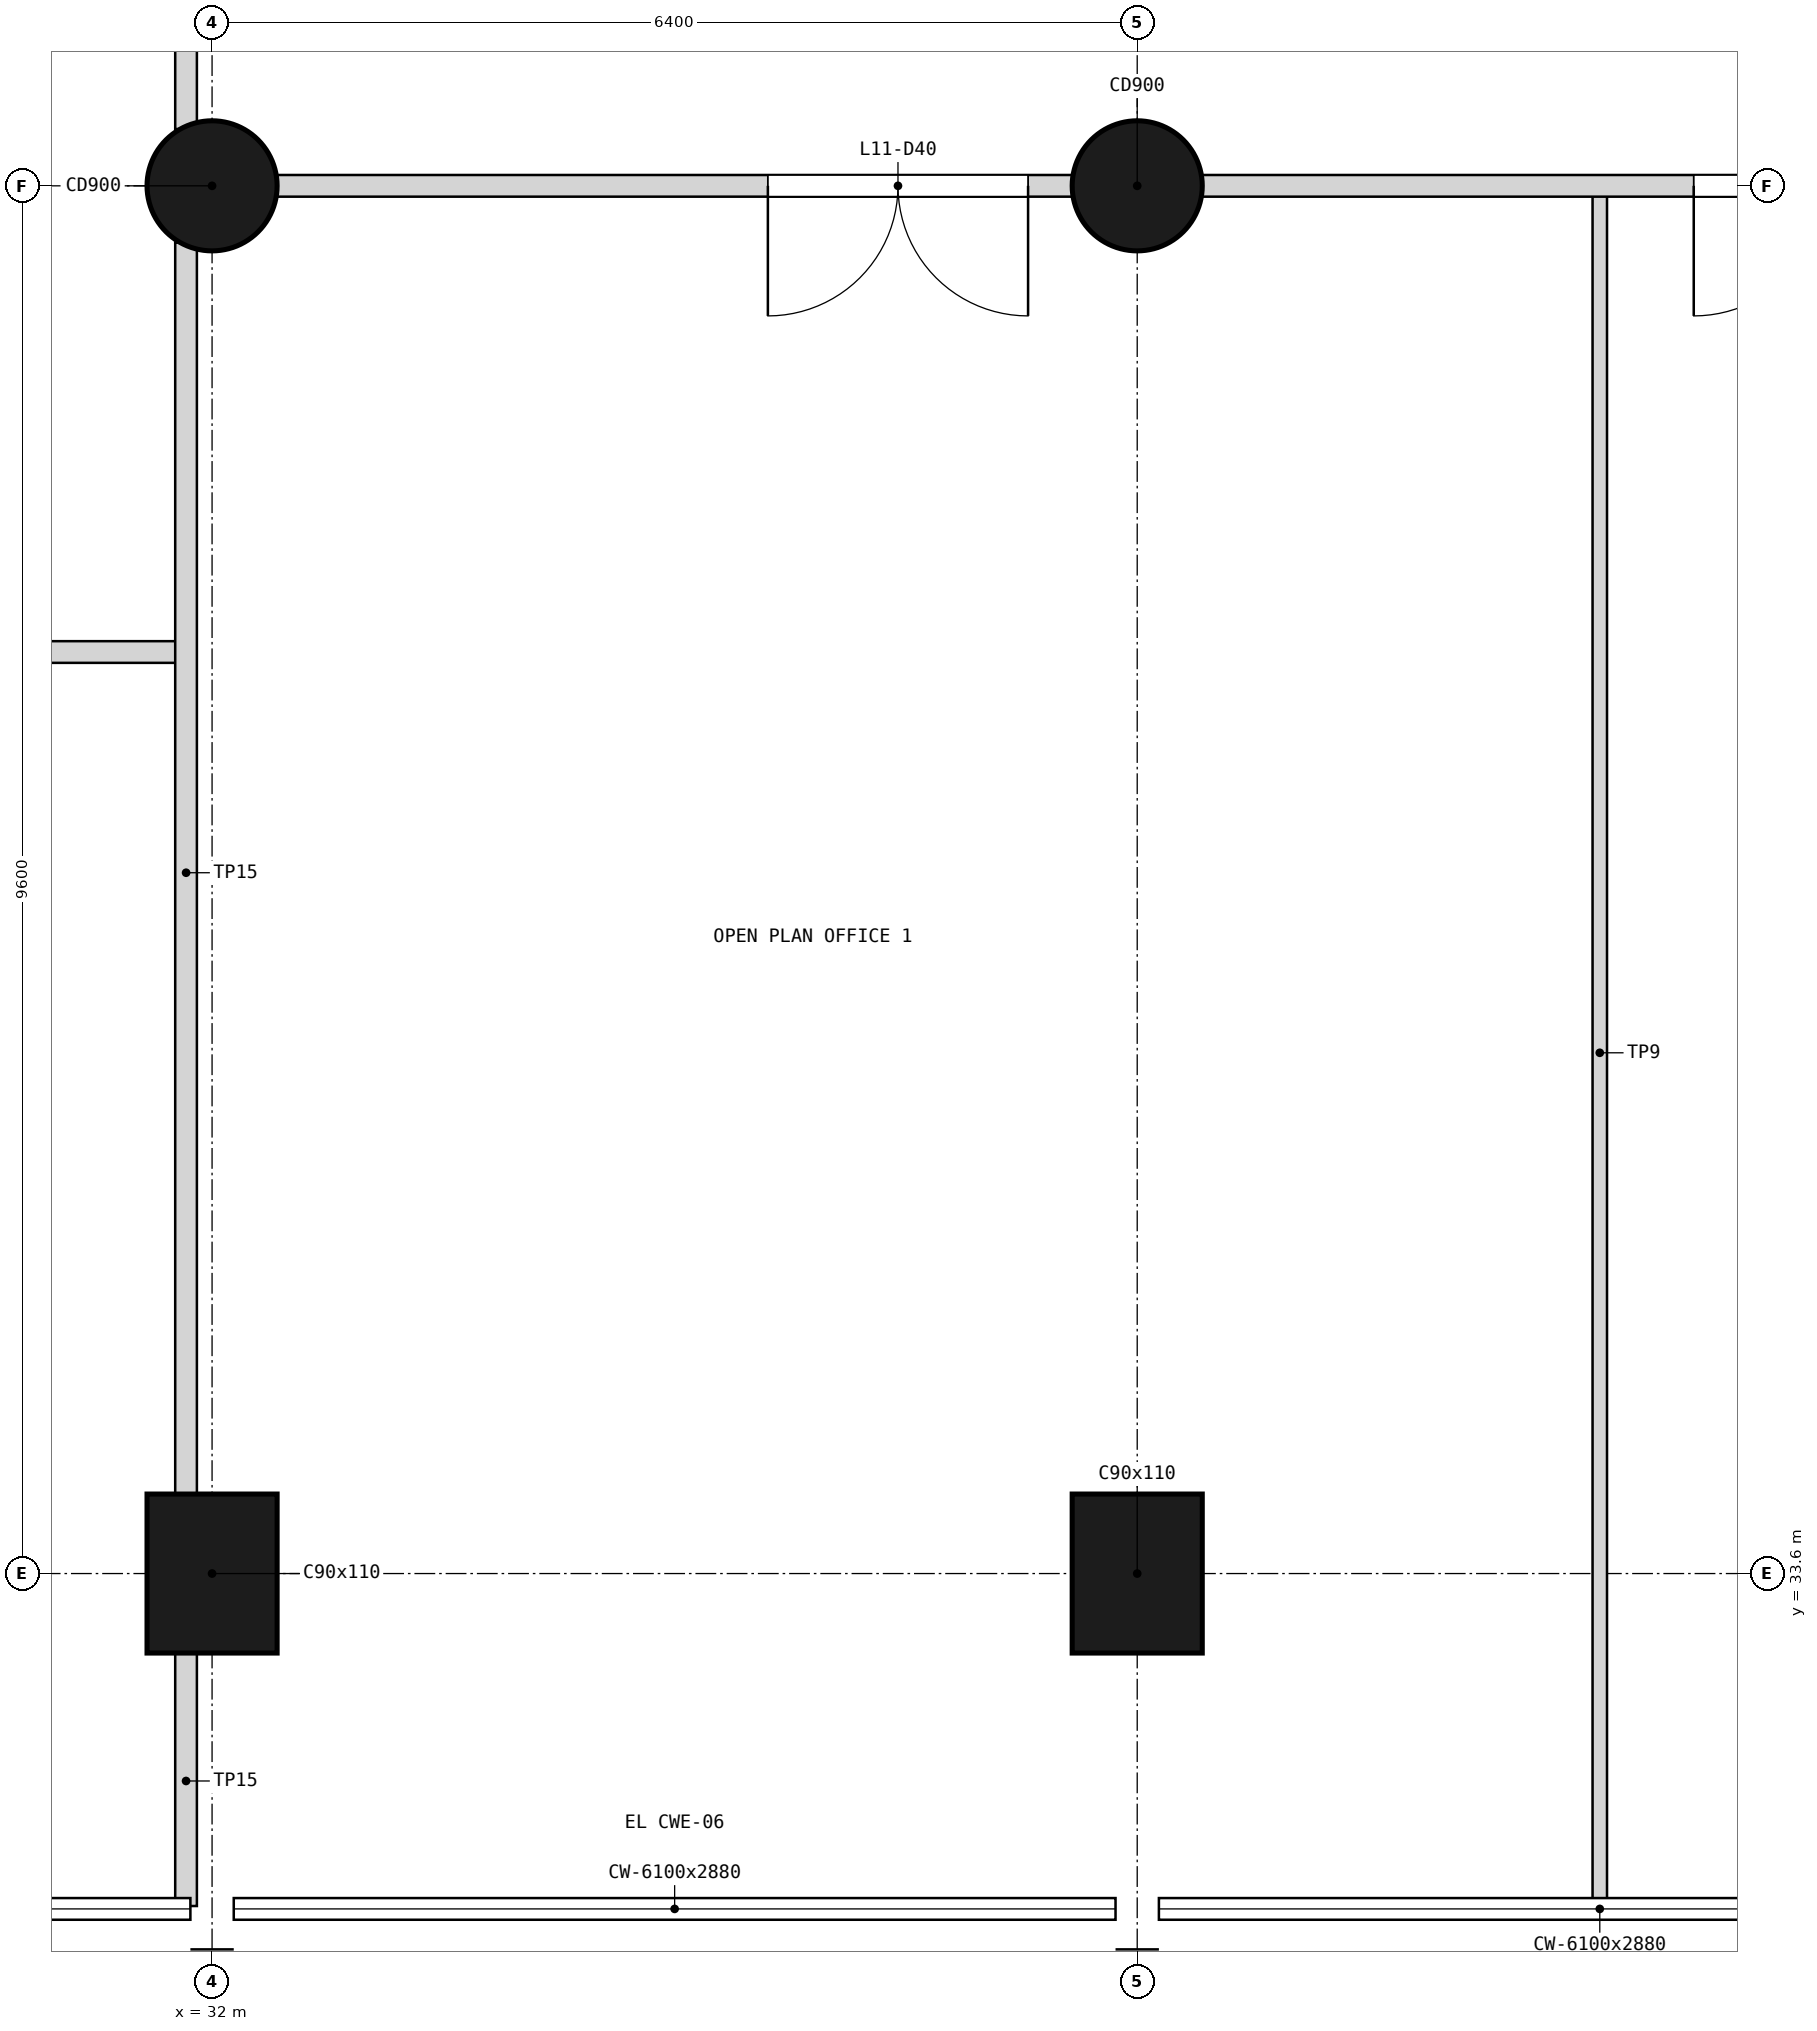
"""IFC4 building model, lengths in metres.
Left out: names, types, materials, properties, quantities, classifications, styles, units other than length and angle.
Written with IfcOpenShell. Run it as: python <this file> out.ifc"""

import sys

from ifc_helpers import new_model, si_unit, direction, frame, frame_2d, origin, origin_2d, place, context, subcontext, project, spatial, rectangle, circle, extrude, element, fill, save


model = new_model("IFC4")
c1 = context("Model", 3, precision=1e-05, world=origin(), true_north=direction((0.0, 1.0)))
c2 = subcontext(c1, "Body", "Model", "MODEL_VIEW")
j1 = project(units=[si_unit("LENGTHUNIT", "METRE"), si_unit("PLANEANGLEUNIT", "RADIAN")], contexts=[c1])
p1 = place(None, origin())
s1 = spatial("IfcSite", under=j1, at=p1, CompositionType="ELEMENT")
p2 = place(p1, origin())
s2 = spatial("IfcBuilding", under=s1, at=p2, CompositionType="ELEMENT")
p3 = place(p2, frame((0.0, 0.0, 44.4)))
s3 = spatial("IfcBuildingStorey", under=s2, at=p3, CompositionType="ELEMENT", Elevation=44.4)
p4 = place(p3, frame((32.0, 33.6, 0.0), z_axis=(0.0, 0.0, 1.0), x_axis=(1.0, 0.0, 0.0)))
e1 = element("IfcColumn", 1, at=p4, inside=s3, PredefinedType="COLUMN", context=c2, shape_type="SweptSolid", body=[
    extrude(rectangle(XDim=0.9, YDim=1.1, at=origin_2d()), origin(), (0.0, 0.0, 1.0), 3.9),
])
p5 = place(p3, frame((32.0, 43.2, 0.0), z_axis=(0.0, 0.0, 1.0), x_axis=(1.0, 0.0, 0.0)))
e2 = element("IfcColumn", 2, at=p5, inside=s3, PredefinedType="COLUMN", context=c2, shape_type="SweptSolid", body=[
    extrude(circle(Radius=0.45, at=origin_2d()), origin(), (0.0, 0.0, 1.0), 3.9),
])
p6 = place(p3, frame((38.4, 33.6, 0.0), z_axis=(0.0, 0.0, 1.0), x_axis=(1.0, 0.0, 0.0)))
e3 = element("IfcColumn", 3, at=p6, inside=s3, PredefinedType="COLUMN", context=c2, shape_type="SweptSolid", body=[
    extrude(rectangle(XDim=0.9, YDim=1.1, at=origin_2d()), origin(), (0.0, 0.0, 1.0), 3.9),
])
p7 = place(p3, frame((38.4, 43.2, 0.0), z_axis=(0.0, 0.0, 1.0), x_axis=(1.0, 0.0, 0.0)))
e4 = element("IfcColumn", 4, at=p7, inside=s3, PredefinedType="COLUMN", context=c2, shape_type="SweptSolid", body=[
    extrude(circle(Radius=0.45, at=origin_2d()), origin(), (0.0, 0.0, 1.0), 3.9),
])
p8 = place(p3, frame((41.6, 31.3, 0.0), z_axis=(0.0, 0.0, 1.0), x_axis=(0.0, 1.0, 0.0)))
e5 = element("IfcWall", 5, at=p8, inside=s3, PredefinedType="PARTITIONING", context=c2, shape_type="SweptSolid", body=[
    extrude(rectangle(XDim=11.9, YDim=0.1, at=frame_2d((5.95, 0.0))), origin(), (0.0, 0.0, 1.0), 3.08),
])
p9 = place(p3, frame((31.82, 43.2, 0.0), z_axis=(0.0, 0.0, 1.0), x_axis=(1.0, 0.0, 0.0)))
e6 = element("IfcWall", 6, at=p9, inside=s3, PredefinedType="PARTITIONING", context=c2, shape_type="SweptSolid", body=[
    extrude(rectangle(XDim=25.96, YDim=0.15, at=frame_2d((12.98, 0.0))), origin(), (0.0, 0.0, 1.0), 2.88),
])
p10 = place(p9, frame((4.025, 0.0, 0.0)))
e7 = element("IfcOpeningElement", 7, at=p10, cuts=e6, PredefinedType="OPENING", context=c2, shape_type="SweptSolid", body=[
    extrude(rectangle(XDim=1.8, YDim=2.1, at=frame_2d((0.9, 1.05))), frame((0.0, 0.085, 0.0), z_axis=(0.0, -1.0, 0.0), x_axis=(1.0, 0.0, 0.0)), (0.0, 0.0, 1.0), 0.17),
])
p11 = place(p9, frame((10.43, 0.0, 0.0)))
e8 = element("IfcOpeningElement", 8, at=p11, cuts=e6, PredefinedType="OPENING", context=c2, shape_type="SweptSolid", body=[
    extrude(rectangle(XDim=1.8, YDim=2.1, at=frame_2d((0.9, 1.05))), frame((0.0, 0.085, 0.0), z_axis=(0.0, -1.0, 0.0), x_axis=(1.0, 0.0, 0.0)), (0.0, 0.0, 1.0), 0.17),
])
p12 = place(p9, frame((17.38, 0.0, 0.0)))
e9 = element("IfcOpeningElement", 9, at=p12, cuts=e6, PredefinedType="OPENING", context=c2, shape_type="SweptSolid", body=[
    extrude(rectangle(XDim=1.0, YDim=2.1, at=frame_2d((0.5, 1.05))), frame((0.0, 0.085, 0.0), z_axis=(0.0, -1.0, 0.0), x_axis=(1.0, 0.0, 0.0)), (0.0, 0.0, 1.0), 0.17),
])
p13 = place(p3, frame((25.85, 39.975, 0.0), z_axis=(0.0, 0.0, 1.0), x_axis=(1.0, 0.0, 0.0)))
e10 = element("IfcWall", 10, at=p13, inside=s3, PredefinedType="PARTITIONING", context=c2, shape_type="SweptSolid", body=[
    extrude(rectangle(XDim=5.97, YDim=0.15, at=frame_2d((2.985, 0.0))), origin(), (0.0, 0.0, 1.0), 3.68),
])
p14 = place(p13, frame((2.45, 0.0, 0.0)))
e11 = element("IfcOpeningElement", 11, at=p14, cuts=e10, PredefinedType="OPENING", context=c2, shape_type="SweptSolid", body=[
    extrude(rectangle(XDim=1.0, YDim=2.1, at=frame_2d((0.5, 1.05))), frame((0.0, 0.085, 0.0), z_axis=(0.0, -1.0, 0.0), x_axis=(1.0, 0.0, 0.0)), (0.0, 0.0, 1.0), 0.17),
])
p15 = place(p3, frame((31.82, 31.3, 0.0), z_axis=(0.0, 0.0, 1.0), x_axis=(0.0, 1.0, 0.0)))
e12 = element("IfcWall", 12, at=p15, inside=s3, PredefinedType="PARTITIONING", context=c2, shape_type="SweptSolid", body=[
    extrude(rectangle(XDim=1.77, YDim=0.15, at=frame_2d((0.885, 0.0))), origin(), (0.0, 0.0, 1.0), 2.78),
])
p16 = place(p3, frame((31.82, 34.13, 0.0), z_axis=(0.0, 0.0, 1.0), x_axis=(0.0, 1.0, 0.0)))
e13 = element("IfcWall", 13, at=p16, inside=s3, PredefinedType="PARTITIONING", context=c2, shape_type="SweptSolid", body=[
    extrude(rectangle(XDim=8.678, YDim=0.15, at=frame_2d((4.339, 0.0))), origin(), (0.0, 0.0, 1.0), 2.78),
])
p17 = place(p3, frame((31.82, 43.592, 0.0), z_axis=(0.0, 0.0, 1.0), x_axis=(0.0, 1.0, 0.0)))
e14 = element("IfcWall", 14, at=p17, inside=s3, PredefinedType="PARTITIONING", context=c2, shape_type="SweptSolid", body=[
    extrude(rectangle(XDim=3.433, YDim=0.15, at=frame_2d((1.716, 0.0))), origin(), (0.0, 0.0, 1.0), 2.78),
])
p18 = place(p10, frame((1.8, 0.0, 0.0), z_axis=(0.0, 0.0, 1.0), x_axis=(-1.0, 0.0, 0.0)))
e15 = element("IfcDoor", 15, at=p18, inside=s3, OperationType="DOUBLE_DOOR_SINGLE_SWING", PredefinedType="DOOR", context=c2, shape_type="SweptSolid", body=[
    extrude(rectangle(XDim=1.8, YDim=2.1, at=frame_2d((0.9, 1.05))), frame((0.0, 0.025, 0.0), z_axis=(0.0, -1.0, 0.0), x_axis=(1.0, 0.0, 0.0)), (0.0, 0.0, 1.0), 0.05),
])
fill(e7, e15)
p19 = place(p11, frame((1.8, 0.0, 0.0), z_axis=(0.0, 0.0, 1.0), x_axis=(-1.0, 0.0, 0.0)))
e16 = element("IfcDoor", 16, at=p19, inside=s3, OperationType="DOUBLE_DOOR_SINGLE_SWING", PredefinedType="DOOR", context=c2, shape_type="SweptSolid", body=[
    extrude(rectangle(XDim=1.8, YDim=2.1, at=frame_2d((0.9, 1.05))), frame((0.0, 0.025, 0.0), z_axis=(0.0, -1.0, 0.0), x_axis=(1.0, 0.0, 0.0)), (0.0, 0.0, 1.0), 0.05),
])
fill(e8, e16)
save(model, sys.argv[1])
